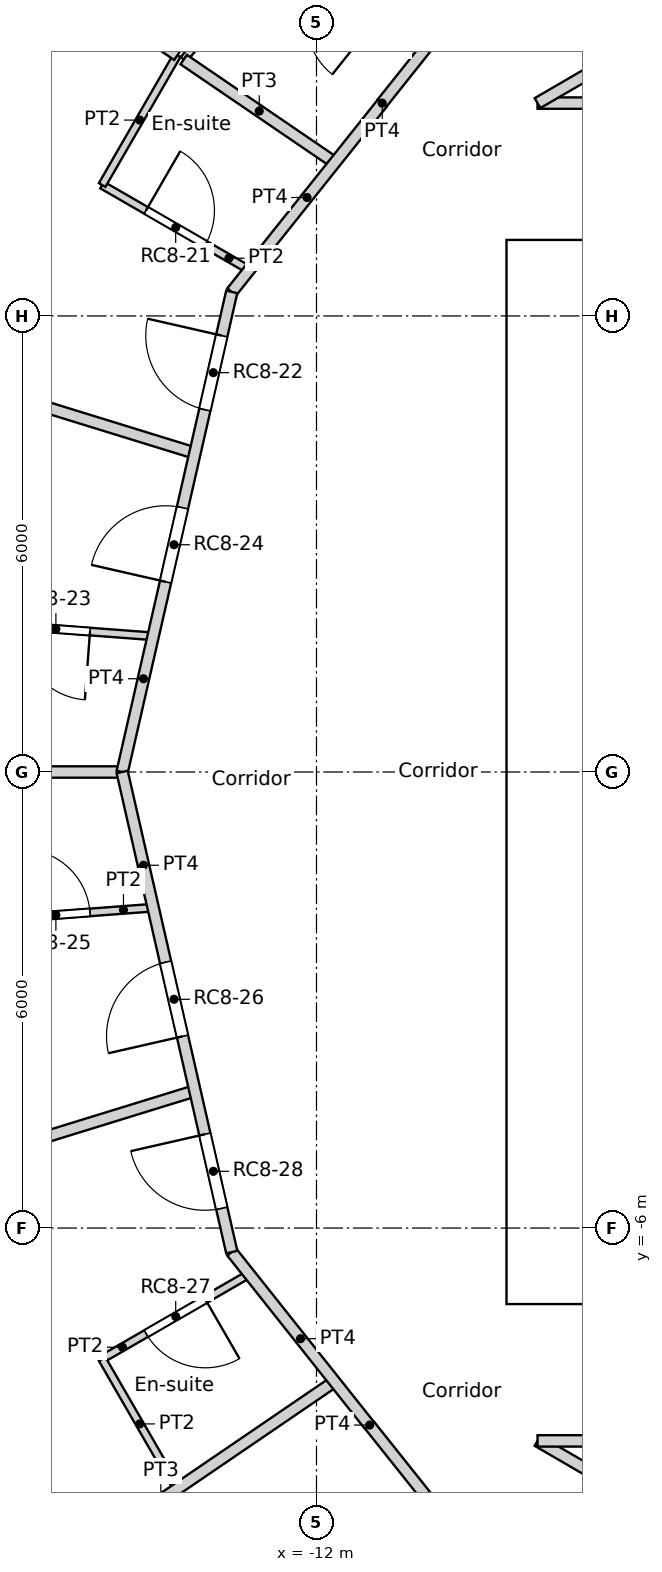
"""IFC4 building model, lengths in metres.
Left out: names, types, materials, properties, quantities, classifications, styles, units other than length and angle.
Written with IfcOpenShell. Run it as: python <this file> out.ifc"""

import sys

from ifc_helpers import new_model, si_unit, direction, frame, frame_2d, origin, place, context, subcontext, project, spatial, rectangle, extrude, element, fill, save


model = new_model("IFC4")
c1 = context("Model", 3, precision=1e-05, world=origin(), true_north=direction((0.0, 1.0)))
c2 = subcontext(c1, "Body", "Model", "MODEL_VIEW")
j1 = project(units=[si_unit("LENGTHUNIT", "METRE"), si_unit("PLANEANGLEUNIT", "RADIAN")], contexts=[c1])
p1 = place(None, origin())
s1 = spatial("IfcSite", under=j1, at=p1, CompositionType="ELEMENT")
p2 = place(p1, origin())
s2 = spatial("IfcBuilding", under=s1, at=p2, CompositionType="ELEMENT")
p3 = place(p2, frame((0.0, 0.0, 305.4)))
s3 = spatial("IfcBuildingStorey", under=s2, at=p3, CompositionType="ELEMENT", Elevation=305.4)
p4 = place(p3, frame((-9.5, -6.7, 0.0), z_axis=(0.0, 0.0, 1.0), x_axis=(1.0, 0.0, 0.0)))
e1 = element("IfcWall", 1, at=p4, inside=s3, PredefinedType="SOLIDWALL", context=c2, shape_type="SweptSolid", body=[
    extrude(rectangle(XDim=19.0, YDim=0.6, at=frame_2d((9.5, 0.0))), origin(), (0.0, 0.0, 1.0), 3.6),
])
p5 = place(p4, frame((10.4, 0.0, 0.0)))
e2 = element("IfcOpeningElement", 2, at=p5, cuts=e1, PredefinedType="OPENING", context=c2, shape_type="SweptSolid", body=[
    extrude(rectangle(XDim=1.0, YDim=2.1, at=frame_2d((0.5, 1.05))), frame((0.0, 0.3, 0.0), z_axis=(0.0, -1.0, 0.0), x_axis=(1.0, 0.0, 0.0)), (0.0, 0.0, 1.0), 0.6),
])
p6 = place(p4, frame((5.35, 0.0, 0.0)))
e3 = element("IfcOpeningElement", 3, at=p6, cuts=e1, PredefinedType="OPENING", context=c2, shape_type="SweptSolid", body=[
    extrude(rectangle(XDim=1.7, YDim=2.1, at=frame_2d((0.85, 1.05))), frame((0.0, 0.3, 0.0), z_axis=(0.0, -1.0, 0.0), x_axis=(1.0, 0.0, 0.0)), (0.0, 0.0, 1.0), 0.6),
])
p7 = place(p4, frame((11.95, 0.0, 0.0)))
e4 = element("IfcOpeningElement", 4, at=p7, cuts=e1, PredefinedType="OPENING", context=c2, shape_type="SweptSolid", body=[
    extrude(rectangle(XDim=1.7, YDim=2.1, at=frame_2d((0.85, 1.05))), frame((0.0, 0.3, 0.0), z_axis=(0.0, -1.0, 0.0), x_axis=(1.0, 0.0, 0.0)), (0.0, 0.0, 1.0), 0.6),
])
p8 = place(p3, frame((-9.5, 6.7, 0.0), z_axis=(0.0, 0.0, 1.0), x_axis=(1.0, 0.0, 0.0)))
e5 = element("IfcWall", 5, at=p8, inside=s3, PredefinedType="SOLIDWALL", context=c2, shape_type="SweptSolid", body=[
    extrude(rectangle(XDim=19.0, YDim=0.6, at=frame_2d((9.5, 0.0))), origin(), (0.0, 0.0, 1.0), 3.6),
])
p9 = place(p8, frame((5.35, 0.0, 0.0)))
e6 = element("IfcOpeningElement", 6, at=p9, cuts=e5, PredefinedType="OPENING", context=c2, shape_type="SweptSolid", body=[
    extrude(rectangle(XDim=1.7, YDim=2.1, at=frame_2d((0.85, 1.05))), frame((0.0, 0.3, 0.0), z_axis=(0.0, -1.0, 0.0), x_axis=(1.0, 0.0, 0.0)), (0.0, 0.0, 1.0), 0.6),
])
p10 = place(p3, frame((-9.2, -6.4, 0.0), z_axis=(0.0, 0.0, 1.0), x_axis=(0.0, 1.0, 0.0)))
e7 = element("IfcWall", 7, at=p10, inside=s3, PredefinedType="SOLIDWALL", context=c2, shape_type="SweptSolid", body=[
    extrude(rectangle(XDim=12.8, YDim=0.6, at=frame_2d((6.4, 0.0))), origin(), (0.0, 0.0, 1.0), 3.6),
])
p11 = place(p3, frame((-8.9, -3.1, 0.0), z_axis=(0.0, 0.0, 1.0), x_axis=(1.0, 0.0, 0.0)))
e8 = element("IfcWall", 8, at=p11, inside=s3, PredefinedType="SOLIDWALL", context=c2, shape_type="SweptSolid", body=[
    extrude(rectangle(XDim=9.6, YDim=0.3, at=frame_2d((4.8, 0.0))), origin(), (0.0, 0.0, 1.0), 3.25),
])
p12 = place(p11, frame((4.75, 0.0, 0.0)))
e9 = element("IfcOpeningElement", 9, at=p12, cuts=e8, PredefinedType="OPENING", context=c2, shape_type="SweptSolid", body=[
    extrude(rectangle(XDim=1.7, YDim=2.1, at=frame_2d((0.85, 1.05))), frame((0.0, 0.15, 0.0), z_axis=(0.0, -1.0, 0.0), x_axis=(1.0, 0.0, 0.0)), (0.0, 0.0, 1.0), 0.3),
])
p13 = place(p3, frame((-8.9, 3.1, 0.0), z_axis=(0.0, 0.0, 1.0), x_axis=(1.0, 0.0, 0.0)))
e10 = element("IfcWall", 10, at=p13, inside=s3, PredefinedType="SOLIDWALL", context=c2, shape_type="SweptSolid", body=[
    extrude(rectangle(XDim=4.55, YDim=0.3, at=frame_2d((2.275, 0.0))), origin(), (0.0, 0.0, 1.0), 3.25),
])
p14 = place(p3, frame((-8.9, 0.0, 0.0), z_axis=(0.0, 0.0, 1.0), x_axis=(1.0, 0.0, 0.0)))
e11 = element("IfcWall", 11, at=p14, inside=s3, PredefinedType="SOLIDWALL", context=c2, shape_type="SweptSolid", body=[
    extrude(rectangle(XDim=3.0, YDim=0.3, at=frame_2d((1.5, 0.0))), origin(), (0.0, 0.0, 1.0), 3.25),
])
p15 = place(p3, frame((-9.092, 8.8, 0.0), z_axis=(0.0, 0.0, 1.0), x_axis=(0.864470922103, 0.502682827277, 0.0)))
e12 = element("IfcWall", 12, at=p15, inside=s3, PredefinedType="PARTITIONING", context=c2, shape_type="SweptSolid", body=[
    extrude(rectangle(XDim=6.735, YDim=0.15, at=frame_2d((3.368, 0.0))), origin(), (0.0, 0.0, 1.0), 3.25),
])
p16 = place(p3, frame((-9.092, 8.8, 0.0), z_axis=(0.0, 0.0, 1.0), x_axis=(1.0, 0.0, 0.0)))
e13 = element("IfcWall", 13, at=p16, inside=s3, PredefinedType="PARTITIONING", context=c2, shape_type="SweptSolid", body=[
    extrude(rectangle(XDim=8.196, YDim=0.15, at=frame_2d((4.098, 0.0))), origin(), (0.0, 0.0, 1.0), 3.25),
])
p17 = place(p16, frame((3.598, 0.0, 0.0)))
e14 = element("IfcOpeningElement", 14, at=p17, cuts=e13, PredefinedType="OPENING", context=c2, shape_type="SweptSolid", body=[
    extrude(rectangle(XDim=1.0, YDim=2.04, at=frame_2d((0.5, 1.02))), frame((0.0, 0.075, 0.0), z_axis=(0.0, -1.0, 0.0), x_axis=(1.0, 0.0, 0.0)), (0.0, 0.0, 1.0), 0.15),
])
p18 = place(p3, frame((-11.136, 8.802, 0.0), z_axis=(0.0, 0.0, 1.0), x_axis=(0.623151397235, 0.782101231379, 0.0)))
e15 = element("IfcWall", 15, at=p18, inside=s3, PredefinedType="PARTITIONING", context=c2, shape_type="SweptSolid", body=[
    extrude(rectangle(XDim=3.301, YDim=0.15, at=frame_2d((1.65, 0.0))), origin(), (0.0, 0.0, 1.0), 3.25),
])
p19 = place(p18, frame((1.981, 0.0, 0.0)))
e16 = element("IfcOpeningElement", 16, at=p19, cuts=e15, PredefinedType="OPENING", context=c2, shape_type="SweptSolid", body=[
    extrude(rectangle(XDim=1.0, YDim=2.1, at=frame_2d((0.5, 1.05))), frame((0.0, 0.075, 0.0), z_axis=(0.0, -1.0, 0.0), x_axis=(1.0, 0.0, 0.0)), (0.0, 0.0, 1.0), 0.15),
])
p20 = place(p3, frame((-11.134, 8.8, 0.0), z_axis=(0.0, 0.0, 1.0), x_axis=(-1.0, 0.0, 0.0)))
e17 = element("IfcWall", 17, at=p20, inside=s3, PredefinedType="PARTITIONING", context=c2, shape_type="SweptSolid", body=[
    extrude(rectangle(XDim=0.003, YDim=0.15, at=frame_2d((0.001, 0.0))), origin(), (0.0, 0.0, 1.0), 3.25),
])
p21 = place(p3, frame((-9.092, -8.8, 0.0), z_axis=(0.0, 0.0, 1.0), x_axis=(1.0, 0.0, 0.0)))
e18 = element("IfcWall", 18, at=p21, inside=s3, PredefinedType="PARTITIONING", context=c2, shape_type="SweptSolid", body=[
    extrude(rectangle(XDim=18.193, YDim=0.15, at=frame_2d((9.096, 0.0))), origin(), (0.0, 0.0, 1.0), 3.25),
])
p22 = place(p21, frame((8.592, 0.0, 0.0)))
e19 = element("IfcOpeningElement", 19, at=p22, cuts=e18, PredefinedType="OPENING", context=c2, shape_type="SweptSolid", body=[
    extrude(rectangle(XDim=1.0, YDim=2.04, at=frame_2d((0.5, 1.02))), frame((0.0, 0.075, 0.0), z_axis=(0.0, -1.0, 0.0), x_axis=(1.0, 0.0, 0.0)), (0.0, 0.0, 1.0), 0.15),
])
p23 = place(p3, frame((-9.092, -8.8, 0.0), z_axis=(0.0, 0.0, 1.0), x_axis=(0.864470922103, -0.502682827277, 0.0)))
e20 = element("IfcWall", 20, at=p23, inside=s3, PredefinedType="PARTITIONING", context=c2, shape_type="SweptSolid", body=[
    extrude(rectangle(XDim=6.735, YDim=0.15, at=frame_2d((3.368, 0.0))), origin(), (0.0, 0.0, 1.0), 3.25),
])
p24 = place(p3, frame((-11.3, -8.596, 0.0), z_axis=(0.0, 0.0, 1.0), x_axis=(0.623165080354, -0.782090328944, 0.0)))
e21 = element("IfcWall", 21, at=p24, inside=s3, PredefinedType="PARTITIONING", context=c2, shape_type="SweptSolid", body=[
    extrude(rectangle(XDim=3.564, YDim=0.15, at=frame_2d((1.782, 0.0))), origin(), (0.0, 0.0, 1.0), 3.25),
])
p25 = place(p3, frame((-11.3, -8.596, 0.0), z_axis=(0.0, 0.0, 1.0), x_axis=(0.0, 1.0, 0.0)))
e22 = element("IfcWall", 22, at=p25, inside=s3, PredefinedType="PARTITIONING", context=c2, shape_type="SweptSolid", body=[
    extrude(rectangle(XDim=0.009, YDim=0.15, at=frame_2d((0.005, 0.0))), origin(), (0.0, 0.0, 1.0), 3.25),
])
p26 = place(p3, frame((-13.115, 6.316, 0.0), z_axis=(0.0, 0.0, 1.0), x_axis=(0.623560523309, 0.781775078761, 0.0)))
e23 = element("IfcWall", 23, at=p26, inside=s3, PredefinedType="PARTITIONING", context=c2, shape_type="SweptSolid", body=[
    extrude(rectangle(XDim=3.177, YDim=0.15, at=frame_2d((1.589, 0.0))), origin(), (0.0, 0.0, 1.0), 3.25),
])
p27 = place(p3, frame((-14.557, 0.0, 0.0), z_axis=(0.0, 0.0, 1.0), x_axis=(0.222533159771, 0.974925121639, 0.0)))
e24 = element("IfcWall", 24, at=p27, inside=s3, PredefinedType="PARTITIONING", context=c2, shape_type="SweptSolid", body=[
    extrude(rectangle(XDim=6.478, YDim=0.15, at=frame_2d((3.239, 0.0))), origin(), (0.0, 0.0, 1.0), 3.25),
])
p28 = place(p27, frame((4.889, 0.0, 0.0)))
e25 = element("IfcOpeningElement", 25, at=p28, cuts=e24, PredefinedType="OPENING", context=c2, shape_type="SweptSolid", body=[
    extrude(rectangle(XDim=1.0, YDim=2.1, at=frame_2d((0.5, 1.05))), frame((0.0, 0.075, 0.0), z_axis=(0.0, -1.0, 0.0), x_axis=(1.0, 0.0, 0.0)), (0.0, 0.0, 1.0), 0.15),
])
p29 = place(p27, frame((2.567, 0.0, 0.0)))
e26 = element("IfcOpeningElement", 26, at=p29, cuts=e24, PredefinedType="OPENING", context=c2, shape_type="SweptSolid", body=[
    extrude(rectangle(XDim=1.0, YDim=2.1, at=frame_2d((0.5, 1.05))), frame((0.0, 0.075, 0.0), z_axis=(0.0, -1.0, 0.0), x_axis=(1.0, 0.0, 0.0)), (0.0, 0.0, 1.0), 0.15),
])
p30 = place(p3, frame((-14.557, 0.0, 0.0), z_axis=(0.0, 0.0, 1.0), x_axis=(0.222568978642, -0.97491694505, 0.0)))
e27 = element("IfcWall", 27, at=p30, inside=s3, PredefinedType="PARTITIONING", context=c2, shape_type="SweptSolid", body=[
    extrude(rectangle(XDim=6.479, YDim=0.15, at=frame_2d((3.239, 0.0))), origin(), (0.0, 0.0, 1.0), 3.25),
])
p31 = place(p30, frame((2.567, 0.0, 0.0)))
e28 = element("IfcOpeningElement", 28, at=p31, cuts=e27, PredefinedType="OPENING", context=c2, shape_type="SweptSolid", body=[
    extrude(rectangle(XDim=1.0, YDim=2.1, at=frame_2d((0.5, 1.05))), frame((0.0, 0.075, 0.0), z_axis=(0.0, -1.0, 0.0), x_axis=(1.0, 0.0, 0.0)), (0.0, 0.0, 1.0), 0.15),
])
p32 = place(p30, frame((4.888, 0.0, 0.0)))
e29 = element("IfcOpeningElement", 29, at=p32, cuts=e27, PredefinedType="OPENING", context=c2, shape_type="SweptSolid", body=[
    extrude(rectangle(XDim=1.0, YDim=2.1, at=frame_2d((0.5, 1.05))), frame((0.0, 0.075, 0.0), z_axis=(0.0, -1.0, 0.0), x_axis=(1.0, 0.0, 0.0)), (0.0, 0.0, 1.0), 0.15),
])
p33 = place(p3, frame((-13.115, -6.316, 0.0), z_axis=(0.0, 0.0, 1.0), x_axis=(0.622042479172, -0.782983495423, 0.0)))
e30 = element("IfcWall", 30, at=p33, inside=s3, PredefinedType="PARTITIONING", context=c2, shape_type="SweptSolid", body=[
    extrude(rectangle(XDim=2.911, YDim=0.15, at=frame_2d((1.456, 0.0))), origin(), (0.0, 0.0, 1.0), 3.25),
])
p34 = place(p3, frame((-12.522, 10.91, 0.0), z_axis=(0.0, 0.0, 1.0), x_axis=(0.781830263661, -0.623491330191, 0.0)))
e31 = element("IfcWall", 31, at=p34, inside=s3, PredefinedType="PARTITIONING", context=c2, shape_type="SweptSolid", body=[
    extrude(rectangle(XDim=2.401, YDim=0.1, at=frame_2d((1.2, 0.0))), origin(), (0.0, 0.0, 1.0), 3.25),
])
p35 = place(p34, frame((0.751, 0.0, 0.0)))
e32 = element("IfcOpeningElement", 32, at=p35, cuts=e31, PredefinedType="OPENING", context=c2, shape_type="SweptSolid", body=[
    extrude(rectangle(XDim=0.9, YDim=2.04, at=frame_2d((0.45, 1.02))), frame((0.0, 0.05, 0.0), z_axis=(0.0, -1.0, 0.0), x_axis=(1.0, 0.0, 0.0)), (0.0, 0.0, 1.0), 0.1),
])
p36 = place(p3, frame((-13.747, 9.373, 0.0), z_axis=(0.0, 0.0, 1.0), x_axis=(0.623330716607, 0.781958322249, 0.0)))
e33 = element("IfcWall", 33, at=p36, inside=s3, PredefinedType="PARTITIONING", context=c2, shape_type="SweptSolid", body=[
    extrude(rectangle(XDim=1.965, YDim=0.1, at=frame_2d((0.983, 0.0))), origin(), (0.0, 0.0, 1.0), 3.25),
])
p37 = place(p3, frame((-16.336, 11.138, 0.0), z_axis=(0.0, 0.0, 1.0), x_axis=(0.826159220299, -0.563436724678, 0.0)))
e34 = element("IfcWall", 34, at=p37, inside=s3, PredefinedType="PARTITIONING", context=c2, shape_type="SweptSolid", body=[
    extrude(rectangle(XDim=3.033, YDim=0.15, at=frame_2d((1.517, 0.0))), origin(), (0.0, 0.0, 1.0), 3.25),
])
p38 = place(p3, frame((-13.747, 9.373, 0.0), z_axis=(0.0, 0.0, 1.0), x_axis=(0.826135036312, -0.563472183677, 0.0)))
e35 = element("IfcWall", 35, at=p38, inside=s3, PredefinedType="PARTITIONING", context=c2, shape_type="SweptSolid", body=[
    extrude(rectangle(XDim=2.406, YDim=0.15, at=frame_2d((1.203, 0.0))), origin(), (0.0, 0.0, 1.0), 3.25),
])
p39 = place(p3, frame((-14.82, 7.722, 0.0), z_axis=(0.0, 0.0, 1.0), x_axis=(0.500143626598, 0.865942465048, 0.0)))
e36 = element("IfcWall", 36, at=p39, inside=s3, PredefinedType="PARTITIONING", context=c2, shape_type="SweptSolid", body=[
    extrude(rectangle(XDim=1.974, YDim=0.1, at=frame_2d((0.987, 0.0))), origin(), (0.0, 0.0, 1.0), 3.25),
])
p40 = place(p3, frame((-14.82, 7.722, 0.0), z_axis=(0.0, 0.0, 1.0), x_axis=(0.866076416361, -0.499911633214, 0.0)))
e37 = element("IfcWall", 37, at=p40, inside=s3, PredefinedType="PARTITIONING", context=c2, shape_type="SweptSolid", body=[
    extrude(rectangle(XDim=2.234, YDim=0.1, at=frame_2d((1.117, 0.0))), origin(), (0.0, 0.0, 1.0), 3.25),
])
p41 = place(p40, frame((0.667, 0.0, 0.0)))
e38 = element("IfcOpeningElement", 38, at=p41, cuts=e37, PredefinedType="OPENING", context=c2, shape_type="SweptSolid", body=[
    extrude(rectangle(XDim=0.9, YDim=2.04, at=frame_2d((0.45, 1.02))), frame((0.0, 0.05, 0.0), z_axis=(0.0, -1.0, 0.0), x_axis=(1.0, 0.0, 0.0)), (0.0, 0.0, 1.0), 0.1),
])
p42 = place(p3, frame((-18.893, 5.828, 0.0), z_axis=(0.0, 0.0, 1.0), x_axis=(0.955580602693, -0.294729896274, 0.0)))
e39 = element("IfcWall", 39, at=p42, inside=s3, PredefinedType="PARTITIONING", context=c2, shape_type="SweptSolid", body=[
    extrude(rectangle(XDim=5.54, YDim=0.15, at=frame_2d((2.77, 0.0))), origin(), (0.0, 0.0, 1.0), 3.25),
])
p43 = place(p3, frame((-16.708, 1.977, 0.0), z_axis=(0.0, 0.0, 1.0), x_axis=(0.997193275785, -0.074870359477, 0.0)))
e40 = element("IfcWall", 40, at=p43, inside=s3, PredefinedType="PARTITIONING", context=c2, shape_type="SweptSolid", body=[
    extrude(rectangle(XDim=2.566, YDim=0.1, at=frame_2d((1.283, 0.0))), origin(), (0.0, 0.0, 1.0), 3.25),
])
p44 = place(p43, frame((0.833, 0.0, 0.0)))
e41 = element("IfcOpeningElement", 41, at=p44, cuts=e40, PredefinedType="OPENING", context=c2, shape_type="SweptSolid", body=[
    extrude(rectangle(XDim=0.9, YDim=2.04, at=frame_2d((0.45, 1.02))), frame((0.0, 0.05, 0.0), z_axis=(0.0, -1.0, 0.0), x_axis=(1.0, 0.0, 0.0)), (0.0, 0.0, 1.0), 0.1),
])
p45 = place(p3, frame((-19.771, 0.0, 0.0), z_axis=(0.0, 0.0, 1.0), x_axis=(1.0, 0.0, 0.0)))
e42 = element("IfcWall", 42, at=p45, inside=s3, PredefinedType="PARTITIONING", context=c2, shape_type="SweptSolid", body=[
    extrude(rectangle(XDim=5.214, YDim=0.15, at=frame_2d((2.607, 0.0))), origin(), (0.0, 0.0, 1.0), 3.25),
])
p46 = place(p3, frame((-16.708, -1.977, 0.0), z_axis=(0.0, 0.0, 1.0), x_axis=(0.997193275785, 0.074870359477, 0.0)))
e43 = element("IfcWall", 43, at=p46, inside=s3, PredefinedType="PARTITIONING", context=c2, shape_type="SweptSolid", body=[
    extrude(rectangle(XDim=2.566, YDim=0.1, at=frame_2d((1.283, 0.0))), origin(), (0.0, 0.0, 1.0), 3.25),
])
p47 = place(p46, frame((0.833, 0.0, 0.0)))
e44 = element("IfcOpeningElement", 44, at=p47, cuts=e43, PredefinedType="OPENING", context=c2, shape_type="SweptSolid", body=[
    extrude(rectangle(XDim=0.9, YDim=2.04, at=frame_2d((0.45, 1.02))), frame((0.0, 0.05, 0.0), z_axis=(0.0, -1.0, 0.0), x_axis=(1.0, 0.0, 0.0)), (0.0, 0.0, 1.0), 0.1),
])
p48 = place(p3, frame((-18.893, -5.828, 0.0), z_axis=(0.0, 0.0, 1.0), x_axis=(0.955580602693, 0.294729896274, 0.0)))
e45 = element("IfcWall", 45, at=p48, inside=s3, PredefinedType="PARTITIONING", context=c2, shape_type="SweptSolid", body=[
    extrude(rectangle(XDim=5.54, YDim=0.15, at=frame_2d((2.77, 0.0))), origin(), (0.0, 0.0, 1.0), 3.25),
])
p49 = place(p3, frame((-14.82, -7.722, 0.0), z_axis=(0.0, 0.0, 1.0), x_axis=(0.866076416361, 0.499911633214, 0.0)))
e46 = element("IfcWall", 46, at=p49, inside=s3, PredefinedType="PARTITIONING", context=c2, shape_type="SweptSolid", body=[
    extrude(rectangle(XDim=2.234, YDim=0.1, at=frame_2d((1.117, 0.0))), origin(), (0.0, 0.0, 1.0), 3.25),
])
p50 = place(p49, frame((0.667, 0.0, 0.0)))
e47 = element("IfcOpeningElement", 47, at=p50, cuts=e46, PredefinedType="OPENING", context=c2, shape_type="SweptSolid", body=[
    extrude(rectangle(XDim=0.9, YDim=2.04, at=frame_2d((0.45, 1.02))), frame((0.0, 0.05, 0.0), z_axis=(0.0, -1.0, 0.0), x_axis=(1.0, 0.0, 0.0)), (0.0, 0.0, 1.0), 0.1),
])
p51 = place(p3, frame((-14.82, -7.722, 0.0), z_axis=(0.0, 0.0, 1.0), x_axis=(0.500143626598, -0.865942465048, 0.0)))
e48 = element("IfcWall", 48, at=p51, inside=s3, PredefinedType="PARTITIONING", context=c2, shape_type="SweptSolid", body=[
    extrude(rectangle(XDim=1.974, YDim=0.1, at=frame_2d((0.987, 0.0))), origin(), (0.0, 0.0, 1.0), 3.25),
])
p52 = place(p3, frame((-16.336, -11.138, 0.0), z_axis=(0.0, 0.0, 1.0), x_axis=(0.82615274451, 0.563446219917, 0.0)))
e49 = element("IfcWall", 49, at=p52, inside=s3, PredefinedType="PARTITIONING", context=c2, shape_type="SweptSolid", body=[
    extrude(rectangle(XDim=5.54, YDim=0.15, at=frame_2d((2.77, 0.0))), origin(), (0.0, 0.0, 1.0), 3.25),
])
p53 = place(p41, origin())
e50 = element("IfcDoor", 50, at=p53, inside=s3, OperationType="SINGLE_SWING_LEFT", PredefinedType="DOOR", context=c2, shape_type="SweptSolid", body=[
    extrude(rectangle(XDim=0.9, YDim=2.04, at=frame_2d((0.45, 1.02))), frame((0.0, 0.025, 0.0), z_axis=(0.0, -1.0, 0.0), x_axis=(1.0, 0.0, 0.0)), (0.0, 0.0, 1.0), 0.05),
])
fill(e38, e50)
p54 = place(p28, origin())
e51 = element("IfcDoor", 51, at=p54, inside=s3, OperationType="SINGLE_SWING_RIGHT", PredefinedType="DOOR", context=c2, shape_type="SweptSolid", body=[
    extrude(rectangle(XDim=1.0, YDim=2.1, at=frame_2d((0.5, 1.05))), frame((0.0, 0.025, 0.0), z_axis=(0.0, -1.0, 0.0), x_axis=(1.0, 0.0, 0.0)), (0.0, 0.0, 1.0), 0.05),
])
fill(e25, e51)
p55 = place(p44, origin())
e52 = element("IfcDoor", 52, at=p55, inside=s3, OperationType="SINGLE_SWING_LEFT", PredefinedType="DOOR", context=c2, shape_type="SweptSolid", body=[
    extrude(rectangle(XDim=0.9, YDim=2.04, at=frame_2d((0.45, 1.02))), frame((0.0, 0.025, 0.0), z_axis=(0.0, -1.0, 0.0), x_axis=(1.0, 0.0, 0.0)), (0.0, 0.0, 1.0), 0.05),
])
fill(e41, e52)
p56 = place(p29, origin())
e53 = element("IfcDoor", 53, at=p56, inside=s3, OperationType="SINGLE_SWING_LEFT", PredefinedType="DOOR", context=c2, shape_type="SweptSolid", body=[
    extrude(rectangle(XDim=1.0, YDim=2.1, at=frame_2d((0.5, 1.05))), frame((0.0, 0.025, 0.0), z_axis=(0.0, -1.0, 0.0), x_axis=(1.0, 0.0, 0.0)), (0.0, 0.0, 1.0), 0.05),
])
fill(e26, e53)
p57 = place(p47, origin())
e54 = element("IfcDoor", 54, at=p57, inside=s3, OperationType="SINGLE_SWING_LEFT", PredefinedType="DOOR", context=c2, shape_type="SweptSolid", body=[
    extrude(rectangle(XDim=0.9, YDim=2.04, at=frame_2d((0.45, 1.02))), frame((0.0, 0.025, 0.0), z_axis=(0.0, -1.0, 0.0), x_axis=(1.0, 0.0, 0.0)), (0.0, 0.0, 1.0), 0.05),
])
fill(e44, e54)
p58 = place(p31, origin())
e55 = element("IfcDoor", 55, at=p58, inside=s3, OperationType="SINGLE_SWING_LEFT", PredefinedType="DOOR", context=c2, shape_type="SweptSolid", body=[
    extrude(rectangle(XDim=1.0, YDim=2.1, at=frame_2d((0.5, 1.05))), frame((0.0, 0.025, 0.0), z_axis=(0.0, -1.0, 0.0), x_axis=(1.0, 0.0, 0.0)), (0.0, 0.0, 1.0), 0.05),
])
fill(e28, e55)
p59 = place(p50, origin())
e56 = element("IfcDoor", 56, at=p59, inside=s3, OperationType="SINGLE_SWING_LEFT", PredefinedType="DOOR", context=c2, shape_type="SweptSolid", body=[
    extrude(rectangle(XDim=0.9, YDim=2.04, at=frame_2d((0.45, 1.02))), frame((0.0, 0.025, 0.0), z_axis=(0.0, -1.0, 0.0), x_axis=(1.0, 0.0, 0.0)), (0.0, 0.0, 1.0), 0.05),
])
fill(e47, e56)
p60 = place(p32, origin())
e57 = element("IfcDoor", 57, at=p60, inside=s3, OperationType="SINGLE_SWING_RIGHT", PredefinedType="DOOR", context=c2, shape_type="SweptSolid", body=[
    extrude(rectangle(XDim=1.0, YDim=2.1, at=frame_2d((0.5, 1.05))), frame((0.0, 0.025, 0.0), z_axis=(0.0, -1.0, 0.0), x_axis=(1.0, 0.0, 0.0)), (0.0, 0.0, 1.0), 0.05),
])
fill(e29, e57)
save(model, sys.argv[1])
